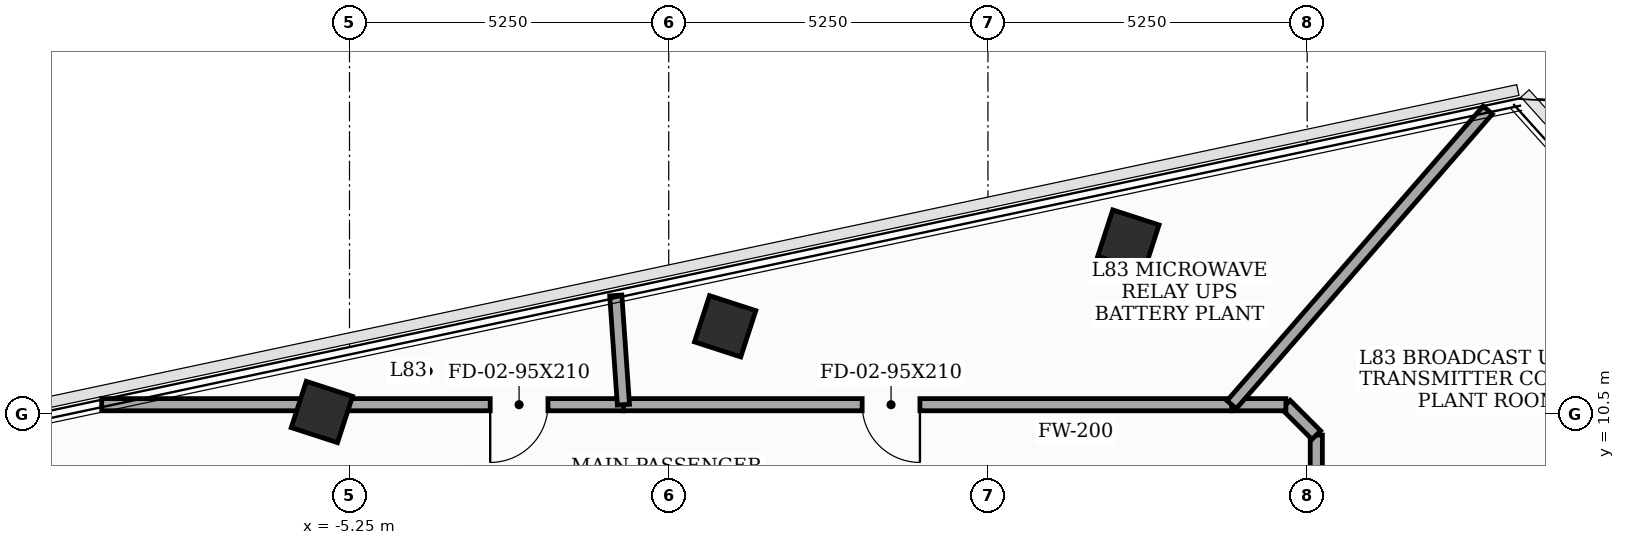
"""IFC4 building model, lengths in metres.
Left out: names, types, materials, properties, quantities, classifications, styles, units other than length and angle.
Written with IfcOpenShell. Run it as: python <this file> out.ifc"""

import sys

from ifc_helpers import new_model, si_unit, direction, frame, frame_2d, origin, origin_2d, place, context, subcontext, project, spatial, rectangle, extrude, element, fill, save


model = new_model("IFC4")
c1 = context("Model", 3, precision=1e-05, world=origin(), true_north=direction((0.0, 1.0)))
c2 = subcontext(c1, "Body", "Model", "MODEL_VIEW")
j1 = project(units=[si_unit("LENGTHUNIT", "METRE"), si_unit("PLANEANGLEUNIT", "RADIAN")], contexts=[c1])
p1 = place(None, origin())
s1 = spatial("IfcSite", under=j1, at=p1, CompositionType="ELEMENT")
p2 = place(p1, origin())
s2 = spatial("IfcBuilding", under=s1, at=p2, CompositionType="ELEMENT")
p3 = place(p2, frame((0.0, 0.0, 322.0)))
s3 = spatial("IfcBuildingStorey", under=s2, at=p3, CompositionType="ELEMENT", Elevation=322.0)
for number, where, z_axis, x_axis in (
    (1, (7.56, 13.35, 0.0), (0.0, 0.0, 1.0), (0.309, 0.951, 0.0)),
    (2, (0.928, 11.94, 0.0), (0.0, 0.0, 1.0), (0.309, 0.951, 0.0)),
    (3, (-5.704, 10.53, 0.0), (0.0, 0.0, 1.0), (0.309, 0.951, 0.0)),
):
    element("IfcColumn", number, at=place(p3, frame(where, z_axis=z_axis, x_axis=x_axis)), inside=s3, PredefinedType="COLUMN", context=c2, shape_type="SweptSolid", body=[
        extrude(rectangle(XDim=0.8, YDim=0.8, at=origin_2d()), origin(), (0.0, 0.0, 1.0), 4.6),
    ])
p4 = place(p3, frame((10.65, 0.745, 0.0), z_axis=(0.0, 0.0, 1.0), x_axis=(0.0, 1.0, 0.0)))
e4 = element("IfcWall", 4, at=p4, inside=s3, PredefinedType="SOLIDWALL", context=c2, shape_type="SweptSolid", body=[
    extrude(rectangle(XDim=9.405, YDim=0.2, at=frame_2d((4.702, 0.0))), origin(), (0.0, 0.0, 1.0), 2.965),
])
p5 = place(p4, frame((2.158, 0.0, 0.0)))
e5 = element("IfcOpeningElement", 5, at=p5, cuts=e4, PredefinedType="OPENING", context=c2, shape_type="SweptSolid", body=[
    extrude(rectangle(XDim=0.95, YDim=2.1, at=frame_2d((0.475, 1.05))), frame((0.0, 0.11, 0.0), z_axis=(0.0, -1.0, 0.0), x_axis=(1.0, 0.0, 0.0)), (0.0, 0.0, 1.0), 0.22),
])
p6 = place(p3, frame((10.65, 10.15, 0.0), z_axis=(0.0, 0.0, 1.0), x_axis=(-0.707106781187, 0.707106781187, 0.0)))
e6 = element("IfcWall", 6, at=p6, inside=s3, PredefinedType="SOLIDWALL", context=c2, shape_type="SweptSolid", body=[
    extrude(rectangle(XDim=0.707, YDim=0.2, at=frame_2d((0.354, 0.0))), origin(), (0.0, 0.0, 1.0), 2.965),
])
p7 = place(p3, frame((10.15, 10.65, 0.0), z_axis=(0.0, 0.0, 1.0), x_axis=(-1.0, 0.0, 0.0)))
e7 = element("IfcWall", 7, at=p7, inside=s3, PredefinedType="SOLIDWALL", context=c2, shape_type="SweptSolid", body=[
    extrude(rectangle(XDim=0.892, YDim=0.2, at=frame_2d((0.446, 0.0))), origin(), (0.0, 0.0, 1.0), 2.965),
])
p8 = place(p3, frame((9.258, 10.65, 0.0), z_axis=(0.0, 0.0, 1.0), x_axis=(-1.0, 0.0, 0.0)))
e8 = element("IfcWall", 8, at=p8, inside=s3, PredefinedType="SOLIDWALL", context=c2, shape_type="SweptSolid", body=[
    extrude(rectangle(XDim=10.003, YDim=0.2, at=frame_2d((5.001, 0.0))), origin(), (0.0, 0.0, 1.0), 2.965),
])
p9 = place(p8, frame((5.127, 0.0, 0.0)))
e9 = element("IfcOpeningElement", 9, at=p9, cuts=e8, PredefinedType="OPENING", context=c2, shape_type="SweptSolid", body=[
    extrude(rectangle(XDim=0.95, YDim=2.1, at=frame_2d((0.475, 1.05))), frame((0.0, 0.11, 0.0), z_axis=(0.0, -1.0, 0.0), x_axis=(1.0, 0.0, 0.0)), (0.0, 0.0, 1.0), 0.22),
])
p10 = place(p3, frame((-0.745, 10.65, 0.0), z_axis=(0.0, 0.0, 1.0), x_axis=(-1.0, 0.0, 0.0)))
e10 = element("IfcWall", 10, at=p10, inside=s3, PredefinedType="SOLIDWALL", context=c2, shape_type="SweptSolid", body=[
    extrude(rectangle(XDim=8.58, YDim=0.2, at=frame_2d((4.29, 0.0))), origin(), (0.0, 0.0, 1.0), 2.965),
])
p11 = place(p10, frame((1.241, 0.0, 0.0)))
e11 = element("IfcOpeningElement", 11, at=p11, cuts=e10, PredefinedType="OPENING", context=c2, shape_type="SweptSolid", body=[
    extrude(rectangle(XDim=0.95, YDim=2.1, at=frame_2d((0.475, 1.05))), frame((0.0, 0.11, 0.0), z_axis=(0.0, -1.0, 0.0), x_axis=(1.0, 0.0, 0.0)), (0.0, 0.0, 1.0), 0.22),
])
p12 = place(p3, frame((13.469, 15.495, 0.0), z_axis=(0.0, 0.0, 1.0), x_axis=(-0.656018638206, -0.754744689498, 0.0)))
e12 = element("IfcWall", 12, at=p12, inside=s3, PredefinedType="SOLIDWALL", context=c2, shape_type="SweptSolid", body=[
    extrude(rectangle(XDim=6.42, YDim=0.2, at=frame_2d((3.21, 0.0))), origin(), (0.0, 0.0, 1.0), 2.965),
])
p13 = place(p3, frame((-0.871, 12.447, 0.0), z_axis=(0.0, 0.0, 1.0), x_axis=(0.069792715716, -0.997561515313, 0.0)))
e13 = element("IfcWall", 13, at=p13, inside=s3, PredefinedType="SOLIDWALL", context=c2, shape_type="SweptSolid", body=[
    extrude(rectangle(XDim=1.802, YDim=0.2, at=frame_2d((0.901, 0.0))), origin(), (0.0, 0.0, 1.0), 2.965),
])
p14 = place(p9, origin())
e14 = element("IfcDoor", 14, at=p14, inside=s3, OperationType="SINGLE_SWING_LEFT", PredefinedType="DOOR", context=c2, shape_type="SweptSolid", body=[
    extrude(rectangle(XDim=0.95, YDim=2.1, at=frame_2d((0.475, 1.05))), frame((0.0, 0.025, 0.0), z_axis=(0.0, -1.0, 0.0), x_axis=(1.0, 0.0, 0.0)), (0.0, 0.0, 1.0), 0.05),
])
fill(e9, e14)
p15 = place(p11, origin())
e15 = element("IfcDoor", 15, at=p15, inside=s3, OperationType="SINGLE_SWING_RIGHT", PredefinedType="DOOR", context=c2, shape_type="SweptSolid", body=[
    extrude(rectangle(XDim=0.95, YDim=2.1, at=frame_2d((0.475, 1.05))), frame((0.0, 0.025, 0.0), z_axis=(0.0, -1.0, 0.0), x_axis=(1.0, 0.0, 0.0)), (0.0, 0.0, 1.0), 0.05),
])
fill(e11, e15)
save(model, sys.argv[1])
